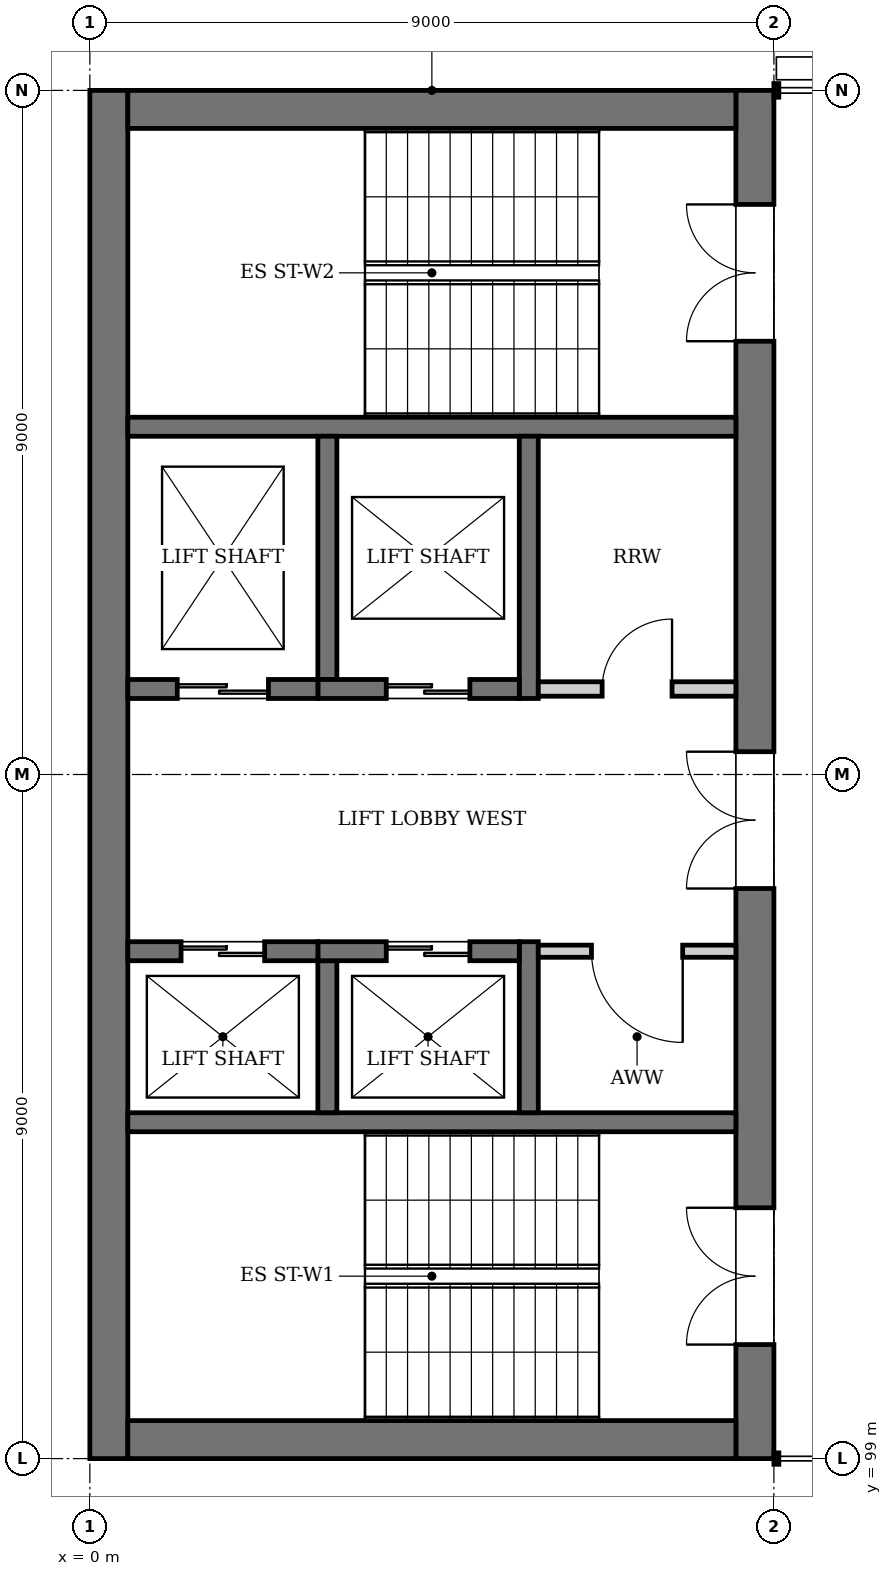
"""IFC4 building model, lengths in metres.
Left out: names, types, materials, properties, quantities, classifications, styles, units other than length and angle.
Written with IfcOpenShell. Run it as: python <this file> out.ifc"""

import sys

from ifc_helpers import new_model, si_unit, direction, frame, frame_2d, origin, place, context, subcontext, project, spatial, rectangle, extrude, element, fill, save


model = new_model("IFC4")
c1 = context("Model", 3, precision=1e-05, world=origin(), true_north=direction((0.0, 1.0)))
c2 = subcontext(c1, "Body", "Model", "MODEL_VIEW")
j1 = project(units=[si_unit("LENGTHUNIT", "METRE"), si_unit("PLANEANGLEUNIT", "RADIAN")], contexts=[c1])
p1 = place(None, origin())
s1 = spatial("IfcSite", under=j1, at=p1, CompositionType="ELEMENT")
p2 = place(p1, origin())
s2 = spatial("IfcBuilding", under=s1, at=p2, CompositionType="ELEMENT")
p3 = place(p2, frame((0.0, 0.0, 39.2)))
s3 = spatial("IfcBuildingStorey", under=s2, at=p3, CompositionType="ELEMENT", Elevation=39.2)
p4 = place(p3, frame((0.25, 99.0, 0.0), z_axis=(0.0, 0.0, 1.0), x_axis=(0.0, 1.0, 0.0)))
e1 = element("IfcWall", 1, at=p4, inside=s3, PredefinedType="SHEAR", context=c2, shape_type="SweptSolid", body=[
    extrude(rectangle(XDim=18.0, YDim=0.5, at=frame_2d((9.0, 0.0))), origin(), (0.0, 0.0, 1.0), 4.0),
])
p5 = place(p3, frame((8.75, 99.0, 0.0), z_axis=(0.0, 0.0, 1.0), x_axis=(0.0, 1.0, 0.0)))
e2 = element("IfcWall", 2, at=p5, inside=s3, PredefinedType="SHEAR", context=c2, shape_type="SweptSolid", body=[
    extrude(rectangle(XDim=18.0, YDim=0.5, at=frame_2d((9.0, 0.0))), origin(), (0.0, 0.0, 1.0), 4.0),
])
p6 = place(p5, frame((1.5, 0.0, 0.0)))
e3 = element("IfcOpeningElement", 3, at=p6, cuts=e2, PredefinedType="OPENING", context=c2, shape_type="SweptSolid", body=[
    extrude(rectangle(XDim=1.8, YDim=2.1, at=frame_2d((0.9, 1.05))), frame((0.0, 0.26, 0.0), z_axis=(0.0, -1.0, 0.0), x_axis=(1.0, 0.0, 0.0)), (0.0, 0.0, 1.0), 0.52),
])
p7 = place(p5, frame((14.7, 0.0, 0.0)))
e4 = element("IfcOpeningElement", 4, at=p7, cuts=e2, PredefinedType="OPENING", context=c2, shape_type="SweptSolid", body=[
    extrude(rectangle(XDim=1.8, YDim=2.1, at=frame_2d((0.9, 1.05))), frame((0.0, 0.26, 0.0), z_axis=(0.0, -1.0, 0.0), x_axis=(1.0, 0.0, 0.0)), (0.0, 0.0, 1.0), 0.52),
])
p8 = place(p5, frame((7.5, 0.0, 0.0)))
e5 = element("IfcOpeningElement", 5, at=p8, cuts=e2, PredefinedType="OPENING", context=c2, shape_type="SweptSolid", body=[
    extrude(rectangle(XDim=1.8, YDim=2.1, at=frame_2d((0.9, 1.05))), frame((0.0, 0.26, 0.0), z_axis=(0.0, -1.0, 0.0), x_axis=(1.0, 0.0, 0.0)), (0.0, 0.0, 1.0), 0.52),
])
for number, where, z_axis, x_axis in (
    (6, (0.5, 99.25, 0.0), (0.0, 0.0, 1.0), (1.0, 0.0, 0.0)),
    (7, (0.5, 116.75, 0.0), (0.0, 0.0, 1.0), (1.0, 0.0, 0.0)),
):
    element("IfcWall", number, at=place(p3, frame(where, z_axis=z_axis, x_axis=x_axis)), inside=s3, PredefinedType="SHEAR", context=c2, shape_type="SweptSolid", body=[
        extrude(rectangle(XDim=8.0, YDim=0.5, at=frame_2d((4.0, 0.0))), origin(), (0.0, 0.0, 1.0), 4.0),
    ])
for number, where, z_axis, x_axis in (
    (8, (8.5, 103.425, 0.0), (0.0, 0.0, 1.0), (-1.0, 0.0, 0.0)),
    (9, (8.5, 112.575, 0.0), (0.0, 0.0, 1.0), (-1.0, 0.0, 0.0)),
):
    element("IfcWall", number, at=place(p3, frame(where, z_axis=z_axis, x_axis=x_axis)), inside=s3, PredefinedType="SOLIDWALL", context=c2, shape_type="SweptSolid", body=[
        extrude(rectangle(XDim=8.0, YDim=0.25, at=frame_2d((4.0, 0.0))), origin(), (0.0, 0.0, 1.0), 3.75),
    ])
p9 = place(p3, frame((5.775, 103.55, 0.0), z_axis=(0.0, 0.0, 1.0), x_axis=(0.0, 1.0, 0.0)))
e10 = element("IfcWall", 10, at=p9, inside=s3, PredefinedType="SOLIDWALL", context=c2, shape_type="SweptSolid", body=[
    extrude(rectangle(XDim=2.25, YDim=0.25, at=frame_2d((1.125, 0.0))), origin(), (0.0, 0.0, 1.0), 4.0),
])
p10 = place(p3, frame((3.125, 103.55, 0.0), z_axis=(0.0, 0.0, 1.0), x_axis=(0.0, 1.0, 0.0)))
e11 = element("IfcWall", 11, at=p10, inside=s3, PredefinedType="SOLIDWALL", context=c2, shape_type="SweptSolid", body=[
    extrude(rectangle(XDim=2.0, YDim=0.25, at=frame_2d((1.0, 0.0))), origin(), (0.0, 0.0, 1.0), 4.0),
])
p11 = place(p3, frame((5.65, 105.675, 0.0), z_axis=(0.0, 0.0, 1.0), x_axis=(-1.0, 0.0, 0.0)))
e12 = element("IfcWall", 12, at=p11, inside=s3, PredefinedType="SOLIDWALL", context=c2, shape_type="SweptSolid", body=[
    extrude(rectangle(XDim=2.65, YDim=0.25, at=frame_2d((1.325, 0.0))), origin(), (0.0, 0.0, 1.0), 4.0),
])
p12 = place(p11, frame((0.65, 0.0, 0.0)))
e13 = element("IfcOpeningElement", 13, at=p12, cuts=e12, PredefinedType="OPENING", context=c2, shape_type="SweptSolid", body=[
    extrude(rectangle(XDim=1.1, YDim=2.1, at=frame_2d((0.55, 1.05))), frame((0.0, 0.135, 0.0), z_axis=(0.0, -1.0, 0.0), x_axis=(1.0, 0.0, 0.0)), (0.0, 0.0, 1.0), 0.27),
])
p13 = place(p3, frame((3.0, 105.675, 0.0), z_axis=(0.0, 0.0, 1.0), x_axis=(-1.0, 0.0, 0.0)))
e14 = element("IfcWall", 14, at=p13, inside=s3, PredefinedType="SOLIDWALL", context=c2, shape_type="SweptSolid", body=[
    extrude(rectangle(XDim=2.5, YDim=0.25, at=frame_2d((1.25, 0.0))), origin(), (0.0, 0.0, 1.0), 4.0),
])
p14 = place(p13, frame((0.7, 0.0, 0.0)))
e15 = element("IfcOpeningElement", 15, at=p14, cuts=e14, PredefinedType="OPENING", context=c2, shape_type="SweptSolid", body=[
    extrude(rectangle(XDim=1.1, YDim=2.1, at=frame_2d((0.55, 1.05))), frame((0.0, 0.135, 0.0), z_axis=(0.0, -1.0, 0.0), x_axis=(1.0, 0.0, 0.0)), (0.0, 0.0, 1.0), 0.27),
])
p15 = place(p3, frame((5.775, 109.0, 0.0), z_axis=(0.0, 0.0, 1.0), x_axis=(0.0, 1.0, 0.0)))
e16 = element("IfcWall", 16, at=p15, inside=s3, PredefinedType="SOLIDWALL", context=c2, shape_type="SweptSolid", body=[
    extrude(rectangle(XDim=3.45, YDim=0.25, at=frame_2d((1.725, 0.0))), origin(), (0.0, 0.0, 1.0), 4.0),
])
p16 = place(p3, frame((3.125, 109.25, 0.0), z_axis=(0.0, 0.0, 1.0), x_axis=(0.0, 1.0, 0.0)))
e17 = element("IfcWall", 17, at=p16, inside=s3, PredefinedType="SOLIDWALL", context=c2, shape_type="SweptSolid", body=[
    extrude(rectangle(XDim=3.2, YDim=0.25, at=frame_2d((1.6, 0.0))), origin(), (0.0, 0.0, 1.0), 4.0),
])
p17 = place(p3, frame((5.65, 109.125, 0.0), z_axis=(0.0, 0.0, 1.0), x_axis=(-1.0, 0.0, 0.0)))
e18 = element("IfcWall", 18, at=p17, inside=s3, PredefinedType="SOLIDWALL", context=c2, shape_type="SweptSolid", body=[
    extrude(rectangle(XDim=2.65, YDim=0.25, at=frame_2d((1.325, 0.0))), origin(), (0.0, 0.0, 1.0), 4.0),
])
p18 = place(p17, frame((0.65, 0.0, 0.0)))
e19 = element("IfcOpeningElement", 19, at=p18, cuts=e18, PredefinedType="OPENING", context=c2, shape_type="SweptSolid", body=[
    extrude(rectangle(XDim=1.1, YDim=2.1, at=frame_2d((0.55, 1.05))), frame((0.0, 0.135, 0.0), z_axis=(0.0, -1.0, 0.0), x_axis=(1.0, 0.0, 0.0)), (0.0, 0.0, 1.0), 0.27),
])
p19 = place(p3, frame((3.0, 109.125, 0.0), z_axis=(0.0, 0.0, 1.0), x_axis=(-1.0, 0.0, 0.0)))
e20 = element("IfcWall", 20, at=p19, inside=s3, PredefinedType="SOLIDWALL", context=c2, shape_type="SweptSolid", body=[
    extrude(rectangle(XDim=2.5, YDim=0.25, at=frame_2d((1.25, 0.0))), origin(), (0.0, 0.0, 1.0), 4.0),
])
p20 = place(p19, frame((0.65, 0.0, 0.0)))
e21 = element("IfcOpeningElement", 21, at=p20, cuts=e20, PredefinedType="OPENING", context=c2, shape_type="SweptSolid", body=[
    extrude(rectangle(XDim=1.2, YDim=2.1, at=frame_2d((0.6, 1.05))), frame((0.0, 0.135, 0.0), z_axis=(0.0, -1.0, 0.0), x_axis=(1.0, 0.0, 0.0)), (0.0, 0.0, 1.0), 0.27),
])
p21 = place(p3, frame((8.5, 105.675, 0.0), z_axis=(0.0, 0.0, 1.0), x_axis=(-1.0, 0.0, 0.0)))
e22 = element("IfcWall", 22, at=p21, inside=s3, PredefinedType="PARTITIONING", context=c2, shape_type="SweptSolid", body=[
    extrude(rectangle(XDim=2.6, YDim=0.16, at=frame_2d((1.3, 0.0))), origin(), (0.0, 0.0, 1.0), 3.75),
])
p22 = place(p21, frame((0.7, 0.0, 0.0)))
e23 = element("IfcOpeningElement", 23, at=p22, cuts=e22, PredefinedType="OPENING", context=c2, shape_type="SweptSolid", body=[
    extrude(rectangle(XDim=1.2, YDim=2.1, at=frame_2d((0.6, 1.05))), frame((0.0, 0.09, 0.0), z_axis=(0.0, -1.0, 0.0), x_axis=(1.0, 0.0, 0.0)), (0.0, 0.0, 1.0), 0.18),
])
p23 = place(p3, frame((8.5, 109.125, 0.0), z_axis=(0.0, 0.0, 1.0), x_axis=(-1.0, 0.0, 0.0)))
e24 = element("IfcWall", 24, at=p23, inside=s3, PredefinedType="PARTITIONING", context=c2, shape_type="SweptSolid", body=[
    extrude(rectangle(XDim=2.6, YDim=0.19, at=frame_2d((1.3, 0.0))), origin(), (0.0, 0.0, 1.0), 3.75),
])
p24 = place(p23, frame((0.84, 0.0, 0.0)))
e25 = element("IfcOpeningElement", 25, at=p24, cuts=e24, PredefinedType="OPENING", context=c2, shape_type="SweptSolid", body=[
    extrude(rectangle(XDim=0.92, YDim=2.1, at=frame_2d((0.46, 1.05))), frame((0.0, 0.105, 0.0), z_axis=(0.0, -1.0, 0.0), x_axis=(1.0, 0.0, 0.0)), (0.0, 0.0, 1.0), 0.21),
])
p25 = place(p12, origin())
e26 = element("IfcDoor", 26, at=p25, inside=s3, OperationType="DOUBLE_DOOR_SLIDING", PredefinedType="DOOR", context=c2, shape_type="SweptSolid", body=[
    extrude(rectangle(XDim=1.1, YDim=2.1, at=frame_2d((0.55, 1.05))), frame((0.0, 0.025, 0.0), z_axis=(0.0, -1.0, 0.0), x_axis=(1.0, 0.0, 0.0)), (0.0, 0.0, 1.0), 0.05),
])
fill(e13, e26)
p26 = place(p14, origin())
e27 = element("IfcDoor", 27, at=p26, inside=s3, OperationType="DOUBLE_DOOR_SLIDING", PredefinedType="DOOR", context=c2, shape_type="SweptSolid", body=[
    extrude(rectangle(XDim=1.1, YDim=2.1, at=frame_2d((0.55, 1.05))), frame((0.0, 0.025, 0.0), z_axis=(0.0, -1.0, 0.0), x_axis=(1.0, 0.0, 0.0)), (0.0, 0.0, 1.0), 0.05),
])
fill(e15, e27)
p27 = place(p18, origin())
e28 = element("IfcDoor", 28, at=p27, inside=s3, OperationType="DOUBLE_DOOR_SLIDING", PredefinedType="DOOR", context=c2, shape_type="SweptSolid", body=[
    extrude(rectangle(XDim=1.1, YDim=2.1, at=frame_2d((0.55, 1.05))), frame((0.0, 0.025, 0.0), z_axis=(0.0, -1.0, 0.0), x_axis=(1.0, 0.0, 0.0)), (0.0, 0.0, 1.0), 0.05),
])
fill(e19, e28)
p28 = place(p20, origin())
e29 = element("IfcDoor", 29, at=p28, inside=s3, OperationType="DOUBLE_DOOR_SLIDING", PredefinedType="DOOR", context=c2, shape_type="SweptSolid", body=[
    extrude(rectangle(XDim=1.2, YDim=2.1, at=frame_2d((0.6, 1.05))), frame((0.0, 0.025, 0.0), z_axis=(0.0, -1.0, 0.0), x_axis=(1.0, 0.0, 0.0)), (0.0, 0.0, 1.0), 0.05),
])
fill(e21, e29)
p29 = place(p6, origin())
e30 = element("IfcDoor", 30, at=p29, inside=s3, OperationType="DOUBLE_DOOR_SINGLE_SWING", PredefinedType="DOOR", context=c2, shape_type="SweptSolid", body=[
    extrude(rectangle(XDim=1.8, YDim=2.1, at=frame_2d((0.9, 1.05))), frame((0.0, 0.025, 0.0), z_axis=(0.0, -1.0, 0.0), x_axis=(1.0, 0.0, 0.0)), (0.0, 0.0, 1.0), 0.05),
])
fill(e3, e30)
p30 = place(p7, origin())
e31 = element("IfcDoor", 31, at=p30, inside=s3, OperationType="DOUBLE_DOOR_SINGLE_SWING", PredefinedType="DOOR", context=c2, shape_type="SweptSolid", body=[
    extrude(rectangle(XDim=1.8, YDim=2.1, at=frame_2d((0.9, 1.05))), frame((0.0, 0.025, 0.0), z_axis=(0.0, -1.0, 0.0), x_axis=(1.0, 0.0, 0.0)), (0.0, 0.0, 1.0), 0.05),
])
fill(e4, e31)
p31 = place(p8, origin())
e32 = element("IfcDoor", 32, at=p31, inside=s3, OperationType="DOUBLE_DOOR_SINGLE_SWING", PredefinedType="DOOR", context=c2, shape_type="SweptSolid", body=[
    extrude(rectangle(XDim=1.8, YDim=2.1, at=frame_2d((0.9, 1.05))), frame((0.0, 0.025, 0.0), z_axis=(0.0, -1.0, 0.0), x_axis=(1.0, 0.0, 0.0)), (0.0, 0.0, 1.0), 0.05),
])
fill(e5, e32)
p32 = place(p22, origin())
e33 = element("IfcDoor", 33, at=p32, inside=s3, OperationType="SINGLE_SWING_LEFT", PredefinedType="DOOR", context=c2, shape_type="SweptSolid", body=[
    extrude(rectangle(XDim=1.2, YDim=2.1, at=frame_2d((0.6, 1.05))), frame((0.0, 0.025, 0.0), z_axis=(0.0, -1.0, 0.0), x_axis=(1.0, 0.0, 0.0)), (0.0, 0.0, 1.0), 0.05),
])
fill(e23, e33)
p33 = place(p24, frame((0.92, 0.0, 0.0), z_axis=(0.0, 0.0, 1.0), x_axis=(-1.0, 0.0, 0.0)))
e34 = element("IfcDoor", 34, at=p33, inside=s3, OperationType="SINGLE_SWING_RIGHT", PredefinedType="DOOR", context=c2, shape_type="SweptSolid", body=[
    extrude(rectangle(XDim=0.92, YDim=2.1, at=frame_2d((0.46, 1.05))), frame((0.0, 0.025, 0.0), z_axis=(0.0, -1.0, 0.0), x_axis=(1.0, 0.0, 0.0)), (0.0, 0.0, 1.0), 0.05),
])
fill(e25, e34)
save(model, sys.argv[1])
